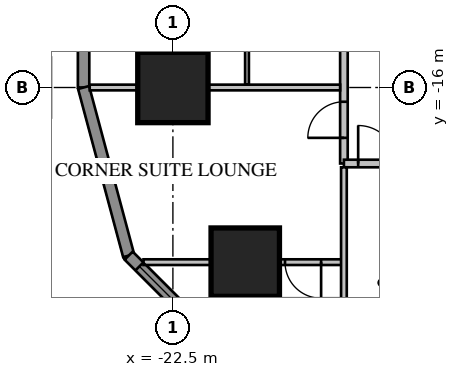
"""IFC4 building model, lengths in metres.
Left out: names, types, materials, properties, quantities, classifications, styles, units other than length and angle.
Written with IfcOpenShell. Run it as: python <this file> out.ifc"""

import sys

from ifc_helpers import new_model, si_unit, direction, frame, frame_2d, origin, origin_2d, place, context, subcontext, project, spatial, rectangle, extrude, element, fill, save


model = new_model("IFC4")
c1 = context("Model", 3, precision=1e-05, world=origin(), true_north=direction((0.0, 1.0)))
c2 = subcontext(c1, "Body", "Model", "MODEL_VIEW")
j1 = project(units=[si_unit("LENGTHUNIT", "METRE"), si_unit("PLANEANGLEUNIT", "RADIAN")], contexts=[c1])
p1 = place(None, origin())
s1 = spatial("IfcSite", under=j1, at=p1, CompositionType="ELEMENT")
p2 = place(p1, origin())
s2 = spatial("IfcBuilding", under=s1, at=p2, CompositionType="ELEMENT")
p3 = place(p2, frame((0.0, 0.0, 46.8)))
s3 = spatial("IfcBuildingStorey", under=s2, at=p3, CompositionType="ELEMENT", Elevation=46.8)
p4 = place(p3, frame((-22.5, -16.0, 0.0), z_axis=(0.0, 0.0, 1.0), x_axis=(1.0, 0.0, 0.0)))
e1 = element("IfcColumn", 1, at=p4, inside=s3, PredefinedType="COLUMN", context=c2, shape_type="SweptSolid", body=[
    extrude(rectangle(XDim=1.85, YDim=1.85, at=origin_2d()), origin(), (0.0, 0.0, 1.0), 3.85),
])
p5 = place(p3, frame((-20.596, -20.596, 0.0), z_axis=(0.0, 0.0, 1.0), x_axis=(1.0, 0.0, 0.0)))
e2 = element("IfcColumn", 2, at=p5, inside=s3, PredefinedType="COLUMN", context=c2, shape_type="SweptSolid", body=[
    extrude(rectangle(XDim=1.8, YDim=1.8, at=origin_2d()), origin(), (0.0, 0.0, 1.0), 3.85),
])
p6 = place(p3, frame((-24.85, 16.0, 0.0), z_axis=(0.0, 0.0, 1.0), x_axis=(0.0, -1.0, 0.0)))
e3 = element("IfcWall", 3, at=p6, inside=s3, PredefinedType="SOLIDWALL", context=c2, shape_type="SweptSolid", body=[
    extrude(rectangle(XDim=32.0, YDim=0.3, at=frame_2d((16.0, 0.0))), origin(), (0.0, 0.0, 1.0), 3.65),
])
p7 = place(p6, frame((1.2, 0.0, 0.75)))
e4 = element("IfcOpeningElement", 4, at=p7, cuts=e3, PredefinedType="OPENING", context=c2, shape_type="SweptSolid", body=[
    extrude(rectangle(XDim=1.6, YDim=1.8, at=frame_2d((0.8, 0.9))), frame((0.0, 0.17, 0.0), z_axis=(0.0, -1.0, 0.0), x_axis=(1.0, 0.0, 0.0)), (0.0, 0.0, 1.0), 0.34),
])
p8 = place(p6, frame((5.2, 0.0, 0.75)))
e5 = element("IfcOpeningElement", 5, at=p8, cuts=e3, PredefinedType="OPENING", context=c2, shape_type="SweptSolid", body=[
    extrude(rectangle(XDim=1.6, YDim=1.8, at=frame_2d((0.8, 0.9))), frame((0.0, 0.17, 0.0), z_axis=(0.0, -1.0, 0.0), x_axis=(1.0, 0.0, 0.0)), (0.0, 0.0, 1.0), 0.34),
])
p9 = place(p6, frame((17.2, 0.0, 0.75)))
e6 = element("IfcOpeningElement", 6, at=p9, cuts=e3, PredefinedType="OPENING", context=c2, shape_type="SweptSolid", body=[
    extrude(rectangle(XDim=1.6, YDim=1.8, at=frame_2d((0.8, 0.9))), frame((0.0, 0.17, 0.0), z_axis=(0.0, -1.0, 0.0), x_axis=(1.0, 0.0, 0.0)), (0.0, 0.0, 1.0), 0.34),
])
p10 = place(p6, frame((21.2, 0.0, 0.75)))
e7 = element("IfcOpeningElement", 7, at=p10, cuts=e3, PredefinedType="OPENING", context=c2, shape_type="SweptSolid", body=[
    extrude(rectangle(XDim=1.6, YDim=1.8, at=frame_2d((0.8, 0.9))), frame((0.0, 0.17, 0.0), z_axis=(0.0, -1.0, 0.0), x_axis=(1.0, 0.0, 0.0)), (0.0, 0.0, 1.0), 0.34),
])
p11 = place(p6, frame((25.2, 0.0, 0.75)))
e8 = element("IfcOpeningElement", 8, at=p11, cuts=e3, PredefinedType="OPENING", context=c2, shape_type="SweptSolid", body=[
    extrude(rectangle(XDim=1.6, YDim=1.8, at=frame_2d((0.8, 0.9))), frame((0.0, 0.17, 0.0), z_axis=(0.0, -1.0, 0.0), x_axis=(1.0, 0.0, 0.0)), (0.0, 0.0, 1.0), 0.34),
])
p12 = place(p6, frame((29.2, 0.0, 0.75)))
e9 = element("IfcOpeningElement", 9, at=p12, cuts=e3, PredefinedType="OPENING", context=c2, shape_type="SweptSolid", body=[
    extrude(rectangle(XDim=1.6, YDim=1.8, at=frame_2d((0.8, 0.9))), frame((0.0, 0.17, 0.0), z_axis=(0.0, -1.0, 0.0), x_axis=(1.0, 0.0, 0.0)), (0.0, 0.0, 1.0), 0.34),
])
p13 = place(p6, frame((8.8, 0.0, 0.75)))
e10 = element("IfcOpeningElement", 10, at=p13, cuts=e3, PredefinedType="OPENING", context=c2, shape_type="SweptSolid", body=[
    extrude(rectangle(XDim=2.4, YDim=1.8, at=frame_2d((1.2, 0.9))), frame((0.0, 0.17, 0.0), z_axis=(0.0, -1.0, 0.0), x_axis=(1.0, 0.0, 0.0)), (0.0, 0.0, 1.0), 0.34),
])
p14 = place(p6, frame((13.812, 0.0, 0.0)))
e11 = element("IfcOpeningElement", 11, at=p14, cuts=e3, PredefinedType="OPENING", context=c2, shape_type="SweptSolid", body=[
    extrude(rectangle(XDim=1.0, YDim=2.4, at=frame_2d((0.5, 1.2))), frame((0.0, 0.17, 0.0), z_axis=(0.0, -1.0, 0.0), x_axis=(1.0, 0.0, 0.0)), (0.0, 0.0, 1.0), 0.34),
])
p15 = place(p3, frame((-24.85, -16.0, 0.0), z_axis=(0.0, 0.0, 1.0), x_axis=(0.258839972501, -0.965920218567, 0.0)))
e12 = element("IfcWall", 12, at=p15, inside=s3, PredefinedType="SOLIDWALL", context=c2, shape_type="SweptSolid", body=[
    extrude(rectangle(XDim=4.581, YDim=0.3, at=frame_2d((2.291, 0.0))), origin(), (0.0, 0.0, 1.0), 3.65),
])
p16 = place(p3, frame((-23.664, -20.425, 0.0), z_axis=(0.0, 0.0, 1.0), x_axis=(0.707106781187, -0.707106781187, 0.0)))
e13 = element("IfcWall", 13, at=p16, inside=s3, PredefinedType="SOLIDWALL", context=c2, shape_type="SweptSolid", body=[
    extrude(rectangle(XDim=4.581, YDim=0.3, at=frame_2d((2.291, 0.0))), origin(), (0.0, 0.0, 1.0), 3.65),
])
p17 = place(p16, frame((0.4, 0.0, 0.75)))
e14 = element("IfcOpeningElement", 14, at=p17, cuts=e13, PredefinedType="OPENING", context=c2, shape_type="SweptSolid", body=[
    extrude(rectangle(XDim=3.781, YDim=1.8, at=frame_2d((1.891, 0.9))), frame((0.0, 0.17, 0.0), z_axis=(0.0, -1.0, 0.0), x_axis=(1.0, 0.0, 0.0)), (0.0, 0.0, 1.0), 0.34),
])
p18 = place(p3, frame((-18.0, 18.0, 0.0), z_axis=(0.0, 0.0, 1.0), x_axis=(0.0, -1.0, 0.0)))
e15 = element("IfcWall", 15, at=p18, inside=s3, PredefinedType="PARTITIONING", context=c2, shape_type="SweptSolid", body=[
    extrude(rectangle(XDim=36.0, YDim=0.2, at=frame_2d((18.0, 0.0))), origin(), (0.0, 0.0, 1.0), 3.65),
])
p19 = place(p18, frame((0.375, 0.0, 0.0)))
e16 = element("IfcOpeningElement", 16, at=p19, cuts=e15, PredefinedType="OPENING", context=c2, shape_type="SweptSolid", body=[
    extrude(rectangle(XDim=1.0, YDim=2.1, at=frame_2d((0.5, 1.05))), frame((0.0, 0.12, 0.0), z_axis=(0.0, -1.0, 0.0), x_axis=(1.0, 0.0, 0.0)), (0.0, 0.0, 1.0), 0.24),
])
p20 = place(p18, frame((2.375, 0.0, 0.0)))
e17 = element("IfcOpeningElement", 17, at=p20, cuts=e15, PredefinedType="OPENING", context=c2, shape_type="SweptSolid", body=[
    extrude(rectangle(XDim=0.95, YDim=2.1, at=frame_2d((0.475, 1.05))), frame((0.0, 0.12, 0.0), z_axis=(0.0, -1.0, 0.0), x_axis=(1.0, 0.0, 0.0)), (0.0, 0.0, 1.0), 0.24),
])
p21 = place(p18, frame((7.95, 0.0, 0.0)))
e18 = element("IfcOpeningElement", 18, at=p21, cuts=e15, PredefinedType="OPENING", context=c2, shape_type="SweptSolid", body=[
    extrude(rectangle(XDim=0.95, YDim=2.1, at=frame_2d((0.475, 1.05))), frame((0.0, 0.12, 0.0), z_axis=(0.0, -1.0, 0.0), x_axis=(1.0, 0.0, 0.0)), (0.0, 0.0, 1.0), 0.24),
])
p22 = place(p18, frame((18.375, 0.0, 0.0)))
e19 = element("IfcOpeningElement", 19, at=p22, cuts=e15, PredefinedType="OPENING", context=c2, shape_type="SweptSolid", body=[
    extrude(rectangle(XDim=0.95, YDim=2.1, at=frame_2d((0.475, 1.05))), frame((0.0, 0.12, 0.0), z_axis=(0.0, -1.0, 0.0), x_axis=(1.0, 0.0, 0.0)), (0.0, 0.0, 1.0), 0.24),
])
p23 = place(p18, frame((23.95, 0.0, 0.0)))
e20 = element("IfcOpeningElement", 20, at=p23, cuts=e15, PredefinedType="OPENING", context=c2, shape_type="SweptSolid", body=[
    extrude(rectangle(XDim=0.95, YDim=2.1, at=frame_2d((0.475, 1.05))), frame((0.0, 0.12, 0.0), z_axis=(0.0, -1.0, 0.0), x_axis=(1.0, 0.0, 0.0)), (0.0, 0.0, 1.0), 0.24),
])
p24 = place(p18, frame((26.375, 0.0, 0.0)))
e21 = element("IfcOpeningElement", 21, at=p24, cuts=e15, PredefinedType="OPENING", context=c2, shape_type="SweptSolid", body=[
    extrude(rectangle(XDim=0.95, YDim=2.1, at=frame_2d((0.475, 1.05))), frame((0.0, 0.12, 0.0), z_axis=(0.0, -1.0, 0.0), x_axis=(1.0, 0.0, 0.0)), (0.0, 0.0, 1.0), 0.24),
])
p25 = place(p18, frame((31.95, 0.0, 0.0)))
e22 = element("IfcOpeningElement", 22, at=p25, cuts=e15, PredefinedType="OPENING", context=c2, shape_type="SweptSolid", body=[
    extrude(rectangle(XDim=0.95, YDim=2.1, at=frame_2d((0.475, 1.05))), frame((0.0, 0.12, 0.0), z_axis=(0.0, -1.0, 0.0), x_axis=(1.0, 0.0, 0.0)), (0.0, 0.0, 1.0), 0.24),
])
p26 = place(p18, frame((34.375, 0.0, 0.0)))
e23 = element("IfcOpeningElement", 23, at=p26, cuts=e15, PredefinedType="OPENING", context=c2, shape_type="SweptSolid", body=[
    extrude(rectangle(XDim=0.95, YDim=2.1, at=frame_2d((0.475, 1.05))), frame((0.0, 0.12, 0.0), z_axis=(0.0, -1.0, 0.0), x_axis=(1.0, 0.0, 0.0)), (0.0, 0.0, 1.0), 0.24),
])
p27 = place(p18, frame((11.2, 0.0, 0.0)))
e24 = element("IfcOpeningElement", 24, at=p27, cuts=e15, PredefinedType="OPENING", context=c2, shape_type="SweptSolid", body=[
    extrude(rectangle(XDim=1.0, YDim=2.1, at=frame_2d((0.5, 1.05))), frame((0.0, 0.12, 0.0), z_axis=(0.0, -1.0, 0.0), x_axis=(1.0, 0.0, 0.0)), (0.0, 0.0, 1.0), 0.24),
])
p28 = place(p3, frame((-18.1, -16.0, 0.0), z_axis=(0.0, 0.0, 1.0), x_axis=(-1.0, 0.0, 0.0)))
e25 = element("IfcWall", 25, at=p28, inside=s3, PredefinedType="PARTITIONING", context=c2, shape_type="SweptSolid", body=[
    extrude(rectangle(XDim=6.589, YDim=0.15, at=frame_2d((3.295, 0.0))), origin(), (0.0, 0.0, 1.0), 3.65),
])
p29 = place(p3, frame((-18.065, -20.596, 0.0), z_axis=(0.0, 0.0, 1.0), x_axis=(-1.0, 0.0, 0.0)))
e26 = element("IfcWall", 26, at=p29, inside=s3, PredefinedType="PARTITIONING", context=c2, shape_type="SweptSolid", body=[
    extrude(rectangle(XDim=5.209, YDim=0.15, at=frame_2d((2.604, 0.0))), origin(), (0.0, 0.0, 1.0), 3.65),
])
p30 = place(p29, frame((0.535, 0.0, 0.0)))
e27 = element("IfcOpeningElement", 27, at=p30, cuts=e26, PredefinedType="OPENING", context=c2, shape_type="SweptSolid", body=[
    extrude(rectangle(XDim=0.95, YDim=2.1, at=frame_2d((0.475, 1.05))), frame((0.0, 0.095, 0.0), z_axis=(0.0, -1.0, 0.0), x_axis=(1.0, 0.0, 0.0)), (0.0, 0.0, 1.0), 0.19),
])
p31 = place(p3, frame((-18.0, -18.0, 0.0), z_axis=(0.0, 0.0, 1.0), x_axis=(1.0, 0.0, 0.0)))
e28 = element("IfcWall", 28, at=p31, inside=s3, PredefinedType="PARTITIONING", context=c2, shape_type="SweptSolid", body=[
    extrude(rectangle(XDim=36.0, YDim=0.2, at=frame_2d((18.0, 0.0))), origin(), (0.0, 0.0, 1.0), 3.65),
])
p32 = place(p31, frame((0.375, 0.0, 0.0)))
e29 = element("IfcOpeningElement", 29, at=p32, cuts=e28, PredefinedType="OPENING", context=c2, shape_type="SweptSolid", body=[
    extrude(rectangle(XDim=1.0, YDim=2.1, at=frame_2d((0.5, 1.05))), frame((0.0, 0.12, 0.0), z_axis=(0.0, -1.0, 0.0), x_axis=(1.0, 0.0, 0.0)), (0.0, 0.0, 1.0), 0.24),
])
p33 = place(p31, frame((2.45, 0.0, 0.0)))
e30 = element("IfcOpeningElement", 30, at=p33, cuts=e28, PredefinedType="OPENING", context=c2, shape_type="SweptSolid", body=[
    extrude(rectangle(XDim=0.8, YDim=2.1, at=frame_2d((0.4, 1.05))), frame((0.0, 0.12, 0.0), z_axis=(0.0, -1.0, 0.0), x_axis=(1.0, 0.0, 0.0)), (0.0, 0.0, 1.0), 0.24),
])
p34 = place(p31, frame((4.05, 0.0, 0.0)))
e31 = element("IfcOpeningElement", 31, at=p34, cuts=e28, PredefinedType="OPENING", context=c2, shape_type="SweptSolid", body=[
    extrude(rectangle(XDim=1.0, YDim=2.1, at=frame_2d((0.5, 1.05))), frame((0.0, 0.12, 0.0), z_axis=(0.0, -1.0, 0.0), x_axis=(1.0, 0.0, 0.0)), (0.0, 0.0, 1.0), 0.24),
])
p35 = place(p31, frame((6.45, 0.0, 0.0)))
e32 = element("IfcOpeningElement", 32, at=p35, cuts=e28, PredefinedType="OPENING", context=c2, shape_type="SweptSolid", body=[
    extrude(rectangle(XDim=0.9, YDim=2.1, at=frame_2d((0.45, 1.05))), frame((0.0, 0.12, 0.0), z_axis=(0.0, -1.0, 0.0), x_axis=(1.0, 0.0, 0.0)), (0.0, 0.0, 1.0), 0.24),
])
p36 = place(p31, frame((8.15, 0.0, 0.0)))
e33 = element("IfcOpeningElement", 33, at=p36, cuts=e28, PredefinedType="OPENING", context=c2, shape_type="SweptSolid", body=[
    extrude(rectangle(XDim=1.0, YDim=2.1, at=frame_2d((0.5, 1.05))), frame((0.0, 0.12, 0.0), z_axis=(0.0, -1.0, 0.0), x_axis=(1.0, 0.0, 0.0)), (0.0, 0.0, 1.0), 0.24),
])
p37 = place(p31, frame((19.95, 0.0, 0.0)))
e34 = element("IfcOpeningElement", 34, at=p37, cuts=e28, PredefinedType="OPENING", context=c2, shape_type="SweptSolid", body=[
    extrude(rectangle(XDim=0.95, YDim=2.1, at=frame_2d((0.475, 1.05))), frame((0.0, 0.12, 0.0), z_axis=(0.0, -1.0, 0.0), x_axis=(1.0, 0.0, 0.0)), (0.0, 0.0, 1.0), 0.24),
])
p38 = place(p31, frame((23.95, 0.0, 0.0)))
e35 = element("IfcOpeningElement", 35, at=p38, cuts=e28, PredefinedType="OPENING", context=c2, shape_type="SweptSolid", body=[
    extrude(rectangle(XDim=0.95, YDim=2.1, at=frame_2d((0.475, 1.05))), frame((0.0, 0.12, 0.0), z_axis=(0.0, -1.0, 0.0), x_axis=(1.0, 0.0, 0.0)), (0.0, 0.0, 1.0), 0.24),
])
p39 = place(p31, frame((27.95, 0.0, 0.0)))
e36 = element("IfcOpeningElement", 36, at=p39, cuts=e28, PredefinedType="OPENING", context=c2, shape_type="SweptSolid", body=[
    extrude(rectangle(XDim=0.95, YDim=2.1, at=frame_2d((0.475, 1.05))), frame((0.0, 0.12, 0.0), z_axis=(0.0, -1.0, 0.0), x_axis=(1.0, 0.0, 0.0)), (0.0, 0.0, 1.0), 0.24),
])
p40 = place(p31, frame((31.95, 0.0, 0.0)))
e37 = element("IfcOpeningElement", 37, at=p40, cuts=e28, PredefinedType="OPENING", context=c2, shape_type="SweptSolid", body=[
    extrude(rectangle(XDim=0.95, YDim=2.1, at=frame_2d((0.475, 1.05))), frame((0.0, 0.12, 0.0), z_axis=(0.0, -1.0, 0.0), x_axis=(1.0, 0.0, 0.0)), (0.0, 0.0, 1.0), 0.24),
])
p41 = place(p31, frame((34.375, 0.0, 0.0)))
e38 = element("IfcOpeningElement", 38, at=p41, cuts=e28, PredefinedType="OPENING", context=c2, shape_type="SweptSolid", body=[
    extrude(rectangle(XDim=0.95, YDim=2.1, at=frame_2d((0.475, 1.05))), frame((0.0, 0.12, 0.0), z_axis=(0.0, -1.0, 0.0), x_axis=(1.0, 0.0, 0.0)), (0.0, 0.0, 1.0), 0.24),
])
p42 = place(p31, frame((11.2, 0.0, 0.0)))
e39 = element("IfcOpeningElement", 39, at=p42, cuts=e28, PredefinedType="OPENING", context=c2, shape_type="SweptSolid", body=[
    extrude(rectangle(XDim=1.0, YDim=2.1, at=frame_2d((0.5, 1.05))), frame((0.0, 0.12, 0.0), z_axis=(0.0, -1.0, 0.0), x_axis=(1.0, 0.0, 0.0)), (0.0, 0.0, 1.0), 0.24),
])
p43 = place(p3, frame((-18.0, -18.1, 0.0), z_axis=(0.0, 0.0, 1.0), x_axis=(0.0, -1.0, 0.0)))
e40 = element("IfcWall", 40, at=p43, inside=s3, PredefinedType="PARTITIONING", context=c2, shape_type="SweptSolid", body=[
    extrude(rectangle(XDim=6.053, YDim=0.15, at=frame_2d((3.027, 0.0))), origin(), (0.0, 0.0, 1.0), 3.65),
])
p44 = place(p3, frame((-20.55, -13.775, 0.0), z_axis=(0.0, 0.0, 1.0), x_axis=(0.0, -1.0, 0.0)))
e41 = element("IfcWall", 41, at=p44, inside=s3, PredefinedType="PARTITIONING", context=c2, shape_type="SweptSolid", body=[
    extrude(rectangle(XDim=2.15, YDim=0.1, at=frame_2d((1.075, 0.0))), origin(), (0.0, 0.0, 1.0), 3.65),
])
p45 = place(p44, frame((0.2, 0.0, 0.0)))
e42 = element("IfcOpeningElement", 42, at=p45, cuts=e41, PredefinedType="OPENING", context=c2, shape_type="SweptSolid", body=[
    extrude(rectangle(XDim=0.9, YDim=2.1, at=frame_2d((0.45, 1.05))), frame((0.0, 0.07, 0.0), z_axis=(0.0, -1.0, 0.0), x_axis=(1.0, 0.0, 0.0)), (0.0, 0.0, 1.0), 0.14),
])
p46 = place(p17, origin())
e43 = element("IfcWindow", 43, at=p46, inside=s3, PartitioningType="SINGLE_PANEL", PredefinedType="WINDOW", context=c2, shape_type="SweptSolid", body=[
    extrude(rectangle(XDim=3.781, YDim=1.8, at=frame_2d((1.891, 0.9))), frame((0.0, 0.03, 0.0), z_axis=(0.0, -1.0, 0.0), x_axis=(1.0, 0.0, 0.0)), (0.0, 0.0, 1.0), 0.06),
])
fill(e14, e43)
p47 = place(p26, origin())
e44 = element("IfcDoor", 44, at=p47, inside=s3, OperationType="SINGLE_SWING_RIGHT", PredefinedType="DOOR", context=c2, shape_type="SweptSolid", body=[
    extrude(rectangle(XDim=0.95, YDim=2.1, at=frame_2d((0.475, 1.05))), frame((0.0, 0.025, 0.0), z_axis=(0.0, -1.0, 0.0), x_axis=(1.0, 0.0, 0.0)), (0.0, 0.0, 1.0), 0.05),
])
fill(e23, e44)
p48 = place(p30, origin())
e45 = element("IfcDoor", 45, at=p48, inside=s3, OperationType="SINGLE_SWING_LEFT", PredefinedType="DOOR", context=c2, shape_type="SweptSolid", body=[
    extrude(rectangle(XDim=0.95, YDim=2.1, at=frame_2d((0.475, 1.05))), frame((0.0, 0.025, 0.0), z_axis=(0.0, -1.0, 0.0), x_axis=(1.0, 0.0, 0.0)), (0.0, 0.0, 1.0), 0.05),
])
fill(e27, e45)
p49 = place(p32, origin())
e46 = element("IfcDoor", 46, at=p49, inside=s3, OperationType="SINGLE_SWING_LEFT", PredefinedType="DOOR", context=c2, shape_type="SweptSolid", body=[
    extrude(rectangle(XDim=1.0, YDim=2.1, at=frame_2d((0.5, 1.05))), frame((0.0, 0.025, 0.0), z_axis=(0.0, -1.0, 0.0), x_axis=(1.0, 0.0, 0.0)), (0.0, 0.0, 1.0), 0.05),
])
fill(e29, e46)
save(model, sys.argv[1])
